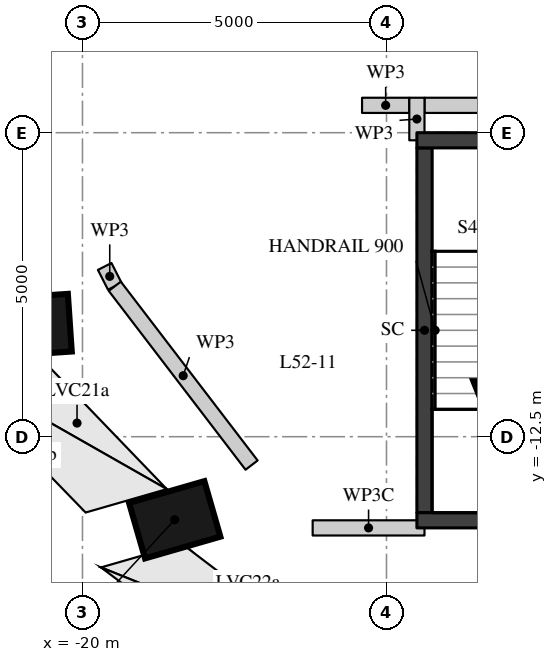
"""IFC4 building model, lengths in metres.
Left out: names, types, materials, properties, quantities, classifications, styles, units other than length and angle.
Written with IfcOpenShell. Run it as: python <this file> out.ifc"""

import sys

from ifc_helpers import new_model, si_unit, direction, frame, frame_2d, origin, origin_2d, place, context, subcontext, project, spatial, rectangle, extrude, element, save


model = new_model("IFC4")
c1 = context("Model", 3, precision=1e-05, world=origin(), true_north=direction((0.0, 1.0)))
c2 = subcontext(c1, "Body", "Model", "MODEL_VIEW")
j1 = project(units=[si_unit("LENGTHUNIT", "METRE"), si_unit("PLANEANGLEUNIT", "RADIAN")], contexts=[c1])
p1 = place(None, origin())
s1 = spatial("IfcSite", under=j1, at=p1, CompositionType="ELEMENT")
p2 = place(p1, origin())
s2 = spatial("IfcBuilding", under=s1, at=p2, CompositionType="ELEMENT")
p3 = place(p2, frame((0.0, 0.0, 184.7)))
s3 = spatial("IfcBuildingStorey", under=s2, at=p3, CompositionType="ELEMENT", Elevation=184.7)
p4 = place(p3, frame((-20.208, -10.625, 0.262), z_axis=(-0.348439204623, -0.023589840472, 0.937034492486), x_axis=(0.934894403892, 0.063293709643, 0.349236824937)))
e1 = element("IfcColumn", 1, at=p4, inside=s3, PredefinedType="COLUMN", context=c2, shape_type="SweptSolid", body=[
    extrude(rectangle(XDim=1.5, YDim=0.95, at=origin_2d()), origin(), (0.0, 0.0, 1.0), 4.243),
])
p5 = place(p3, frame((-17.864, -13.688, 0.228), z_axis=(-0.291769575471, -0.08414328581, 0.952780364136), x_axis=(0.915471408279, 0.264012353699, 0.303660299871)))
e2 = element("IfcColumn", 2, at=p5, inside=s3, PredefinedType="COLUMN", context=c2, shape_type="SweptSolid", body=[
    extrude(rectangle(XDim=1.5, YDim=0.95, at=origin_2d()), origin(), (0.0, 0.0, 1.0), 4.245),
])
p6 = place(p3, frame((-14.375, -13.75, -0.45), z_axis=(0.0, 0.0, 1.0), x_axis=(0.0, 1.0, 0.0)))
e3 = element("IfcWall", 3, at=p6, inside=s3, PredefinedType="SHEAR", context=c2, shape_type="SweptSolid", body=[
    extrude(rectangle(XDim=6.0, YDim=0.25, at=frame_2d((3.0, 0.0))), origin(), (0.0, 0.0, 1.0), 4.67),
])
for number, where, z_axis, x_axis in (
    (4, (-14.5, -7.625, -0.45), (0.0, 0.0, 1.0), (1.0, 0.0, 0.0)),
    (5, (-14.5, -13.875, -0.45), (0.0, 0.0, 1.0), (1.0, 0.0, 0.0)),
):
    element("IfcWall", number, at=place(p3, frame(where, z_axis=z_axis, x_axis=x_axis)), inside=s3, PredefinedType="SHEAR", context=c2, shape_type="SweptSolid", body=[
        extrude(rectangle(XDim=5.2, YDim=0.25, at=frame_2d((2.6, 0.0))), origin(), (0.0, 0.0, 1.0), 4.67),
    ])
p7 = place(p3, frame((-19.635, -9.7, 0.0), z_axis=(0.0, 0.0, 1.0), x_axis=(0.453345581503, -0.891334832558, 0.0)))
e6 = element("IfcWall", 6, at=p7, inside=s3, PredefinedType="PARTITIONING", context=c2, shape_type="SweptSolid", body=[
    extrude(rectangle(XDim=0.366, YDim=0.25, at=frame_2d((0.183, 0.0))), origin(), (0.0, 0.0, 1.0), 4.22),
])
p8 = place(p3, frame((-19.469, -10.026, 0.0), z_axis=(0.0, 0.0, 1.0), x_axis=(0.607609144604, -0.794236191189, 0.0)))
e7 = element("IfcWall", 7, at=p8, inside=s3, PredefinedType="PARTITIONING", context=c2, shape_type="SweptSolid", body=[
    extrude(rectangle(XDim=3.703, YDim=0.25, at=frame_2d((1.852, 0.0))), origin(), (0.0, 0.0, 1.0), 4.22),
])
p9 = place(p3, frame((-16.214, -14.0, 0.0), z_axis=(0.0, 0.0, 1.0), x_axis=(1.0, 0.0, 0.0)))
e8 = element("IfcWall", 8, at=p9, inside=s3, PredefinedType="PARTITIONING", context=c2, shape_type="SweptSolid", body=[
    extrude(rectangle(XDim=1.839, YDim=0.25, at=frame_2d((0.92, 0.0))), origin(), (0.0, 0.0, 1.0), 3.77),
])
p10 = place(p3, frame((-15.402, -7.05, 0.0), z_axis=(0.0, 0.0, 1.0), x_axis=(1.0, 0.0, 0.0)))
e9 = element("IfcWall", 9, at=p10, inside=s3, PredefinedType="PARTITIONING", context=c2, shape_type="SweptSolid", body=[
    extrude(rectangle(XDim=0.777, YDim=0.25, at=frame_2d((0.389, 0.0))), origin(), (0.0, 0.0, 1.0), 4.22),
])
p11 = place(p3, frame((-14.375, -7.05, 0.0), z_axis=(0.0, 0.0, 1.0), x_axis=(1.0, 0.0, 0.0)))
e10 = element("IfcWall", 10, at=p11, inside=s3, PredefinedType="PARTITIONING", context=c2, shape_type="SweptSolid", body=[
    extrude(rectangle(XDim=4.75, YDim=0.25, at=frame_2d((2.375, 0.0))), origin(), (0.0, 0.0, 1.0), 4.22),
])
p12 = place(p3, frame((-14.5, -7.625, 0.0), z_axis=(0.0, 0.0, 1.0), x_axis=(0.0, 1.0, 0.0)))
e11 = element("IfcWall", 11, at=p12, inside=s3, PredefinedType="PARTITIONING", context=c2, shape_type="SweptSolid", body=[
    extrude(rectangle(XDim=0.7, YDim=0.25, at=frame_2d((0.35, 0.0))), origin(), (0.0, 0.0, 1.0), 4.22),
])
save(model, sys.argv[1])
